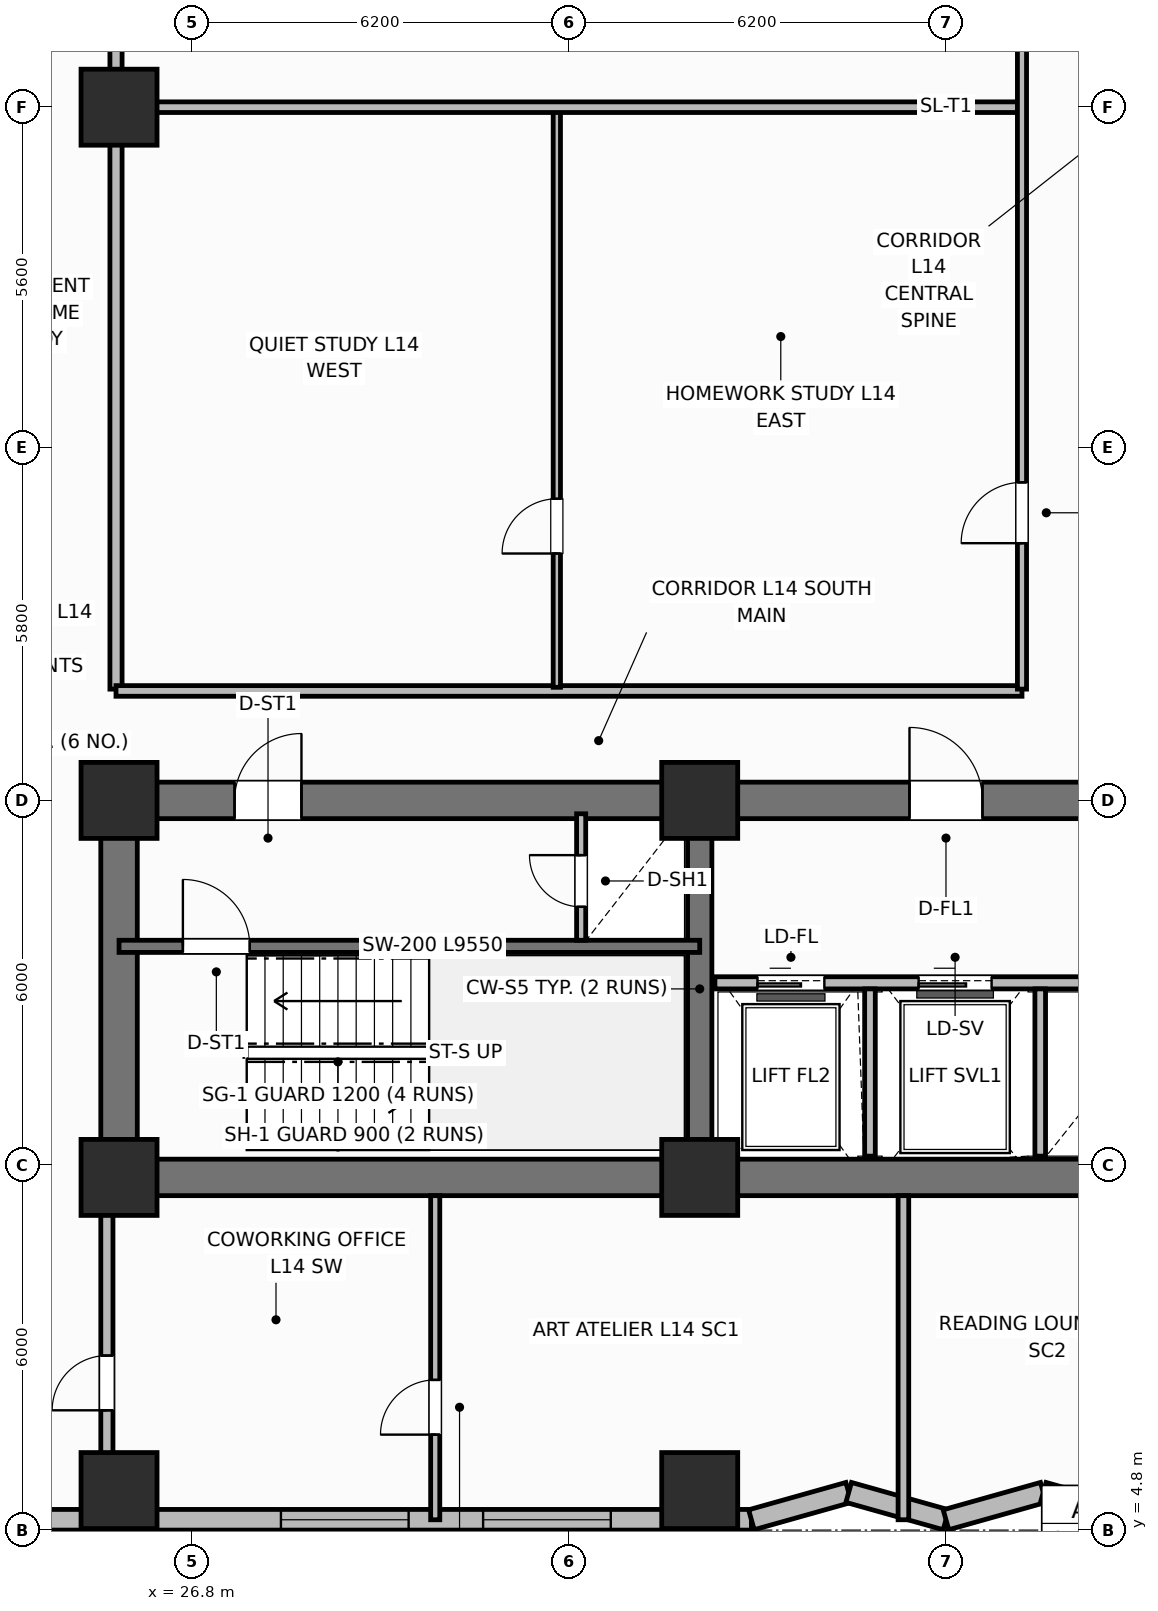
"""IFC4 building model, lengths in metres.
Left out: names, types, materials, properties, quantities, classifications, styles, units other than length and angle.
Written with IfcOpenShell. Run it as: python <this file> out.ifc"""

import sys

from ifc_helpers import new_model, si_unit, direction, frame, frame_2d, origin, origin_2d, place, context, subcontext, project, spatial, rectangle, extrude, element, fill, save


model = new_model("IFC4")
c1 = context("Model", 3, precision=1e-05, world=origin(), true_north=direction((0.0, 1.0)))
c2 = subcontext(c1, "Body", "Model", "MODEL_VIEW")
j1 = project(units=[si_unit("LENGTHUNIT", "METRE"), si_unit("PLANEANGLEUNIT", "RADIAN")], contexts=[c1])
p1 = place(None, origin())
s1 = spatial("IfcSite", under=j1, at=p1, CompositionType="ELEMENT")
p2 = place(p1, origin())
s2 = spatial("IfcBuilding", under=s1, at=p2, CompositionType="ELEMENT")
p3 = place(p2, frame((0.0, 0.0, 58.4)))
s3 = spatial("IfcBuildingStorey", under=s2, at=p3, CompositionType="ELEMENT", Elevation=58.4)
p4 = place(p3, frame((52.8, 10.6, 0.0), z_axis=(0.0, 0.0, 1.0), x_axis=(-1.0, 0.0, 0.0)))
e1 = element("IfcWall", 1, at=p4, inside=s3, PredefinedType="SHEAR", context=c2, shape_type="SweptSolid", body=[
    extrude(rectangle(XDim=27.2, YDim=0.6, at=frame_2d((13.6, 0.0))), origin(), (0.0, 0.0, 1.0), 3.7),
])
p5 = place(p3, frame((25.6, 10.9, 0.0), z_axis=(0.0, 0.0, 1.0), x_axis=(0.0, 1.0, 0.0)))
e2 = element("IfcWall", 2, at=p5, inside=s3, PredefinedType="SHEAR", context=c2, shape_type="SweptSolid", body=[
    extrude(rectangle(XDim=5.6, YDim=0.6, at=frame_2d((2.8, 0.0))), origin(), (0.0, 0.0, 1.0), 3.7),
])
p6 = place(p3, frame((25.6, 16.8, 0.0), z_axis=(0.0, 0.0, 1.0), x_axis=(1.0, 0.0, 0.0)))
e3 = element("IfcWall", 3, at=p6, inside=s3, PredefinedType="SHEAR", context=c2, shape_type="SweptSolid", body=[
    extrude(rectangle(XDim=27.2, YDim=0.6, at=frame_2d((13.6, 0.0))), origin(), (0.0, 0.0, 1.0), 3.7),
])
p7 = place(p6, frame((1.9, 0.0, 0.0)))
e4 = element("IfcOpeningElement", 4, at=p7, cuts=e3, PredefinedType="OPENING", context=c2, shape_type="SweptSolid", body=[
    extrude(rectangle(XDim=1.1, YDim=2.15, at=frame_2d((0.55, 1.075))), frame((0.0, 0.31, 0.0), z_axis=(0.0, -1.0, 0.0), x_axis=(1.0, 0.0, 0.0)), (0.0, 0.0, 1.0), 0.62),
])
p8 = place(p6, frame((13.0, 0.0, 0.0)))
e5 = element("IfcOpeningElement", 5, at=p8, cuts=e3, PredefinedType="OPENING", context=c2, shape_type="SweptSolid", body=[
    extrude(rectangle(XDim=1.2, YDim=2.15, at=frame_2d((0.6, 1.075))), frame((0.0, 0.31, 0.0), z_axis=(0.0, -1.0, 0.0), x_axis=(1.0, 0.0, 0.0)), (0.0, 0.0, 1.0), 0.62),
])
p9 = place(p6, frame((20.4, 0.0, 0.0)))
e6 = element("IfcOpeningElement", 6, at=p9, cuts=e3, PredefinedType="OPENING", context=c2, shape_type="SweptSolid", body=[
    extrude(rectangle(XDim=1.3, YDim=2.2, at=frame_2d((0.65, 1.1))), frame((0.0, 0.31, 0.0), z_axis=(0.0, -1.0, 0.0), x_axis=(1.0, 0.0, 0.0)), (0.0, 0.0, 1.0), 0.62),
])
p10 = place(p6, frame((24.65, 0.0, 0.0)))
e7 = element("IfcOpeningElement", 7, at=p10, cuts=e3, PredefinedType="OPENING", context=c2, shape_type="SweptSolid", body=[
    extrude(rectangle(XDim=0.85, YDim=2.1, at=frame_2d((0.425, 1.05))), frame((0.0, 0.31, 0.0), z_axis=(0.0, -1.0, 0.0), x_axis=(1.0, 0.0, 0.0)), (0.0, 0.0, 1.0), 0.62),
])
p11 = place(p3, frame((35.15, 10.9, 0.0), z_axis=(0.0, 0.0, 1.0), x_axis=(0.0, 1.0, 0.0)))
e8 = element("IfcWall", 8, at=p11, inside=s3, PredefinedType="SHEAR", context=c2, shape_type="SweptSolid", body=[
    extrude(rectangle(XDim=5.6, YDim=0.4, at=frame_2d((2.8, 0.0))), origin(), (0.0, 0.0, 1.0), 3.7),
])
for number, where, z_axis, x_axis in (
    (9, (25.6, 10.6, 0.0), (0.0, 0.0, 1.0), (1.0, 0.0, 0.0)),
    (10, (25.6, 16.8, 0.0), (0.0, 0.0, 1.0), (1.0, 0.0, 0.0)),
    (11, (35.15, 10.6, 0.0), (0.0, 0.0, 1.0), (1.0, 0.0, 0.0)),
    (12, (35.15, 16.8, 0.0), (0.0, 0.0, 1.0), (1.0, 0.0, 0.0)),
    (13, (25.6, 28.2, 0.0), (0.0, 0.0, 1.0), (1.0, 0.0, 0.0)),
    (14, (25.6, 5.45, 0.0), (0.0, 0.0, 1.0), (1.0, 0.0, 0.0)),
    (15, (35.15, 5.45, 0.0), (0.0, 0.0, 1.0), (1.0, 0.0, 0.0)),
):
    element("IfcColumn", number, at=place(p3, frame(where, z_axis=z_axis, x_axis=x_axis)), inside=s3, PredefinedType="COLUMN", context=c2, shape_type="SweptSolid", body=[
        extrude(rectangle(XDim=1.25, YDim=1.25, at=origin_2d()), origin(), (0.0, 0.0, 1.0), 3.7),
    ])
p12 = place(p3, frame((18.6, 4.97, 0.0), z_axis=(0.0, 0.0, 1.0), x_axis=(1.0, 0.0, 0.0)))
e16 = element("IfcWall", 16, at=p12, inside=s3, PredefinedType="SOLIDWALL", context=c2, shape_type="SweptSolid", body=[
    extrude(rectangle(XDim=17.4, YDim=0.34, at=frame_2d((8.7, 0.0))), origin(), (0.0, 0.0, 1.0), 2.7),
])
p13 = place(p12, frame((1.262, 0.0, 0.68)))
e17 = element("IfcOpeningElement", 17, at=p13, cuts=e16, PredefinedType="OPENING", context=c2, shape_type="SweptSolid", body=[
    extrude(rectangle(XDim=2.1, YDim=1.9, at=frame_2d((1.05, 0.95))), frame((0.0, 0.18, 0.0), z_axis=(0.0, -1.0, 0.0), x_axis=(1.0, 0.0, 0.0)), (0.0, 0.0, 1.0), 0.36),
])
p14 = place(p12, frame((9.663, 0.0, 0.68)))
e18 = element("IfcOpeningElement", 18, at=p14, cuts=e16, PredefinedType="OPENING", context=c2, shape_type="SweptSolid", body=[
    extrude(rectangle(XDim=2.1, YDim=1.9, at=frame_2d((1.05, 0.95))), frame((0.0, 0.18, 0.0), z_axis=(0.0, -1.0, 0.0), x_axis=(1.0, 0.0, 0.0)), (0.0, 0.0, 1.0), 0.36),
])
p15 = place(p12, frame((12.988, 0.0, 0.68)))
e19 = element("IfcOpeningElement", 19, at=p15, cuts=e16, PredefinedType="OPENING", context=c2, shape_type="SweptSolid", body=[
    extrude(rectangle(XDim=2.1, YDim=1.9, at=frame_2d((1.05, 0.95))), frame((0.0, 0.18, 0.0), z_axis=(0.0, -1.0, 0.0), x_axis=(1.0, 0.0, 0.0)), (0.0, 0.0, 1.0), 0.36),
])
p16 = place(p3, frame((36.0, 4.97, 0.0), z_axis=(0.0, 0.0, 1.0), x_axis=(0.962662902433, 0.270703040766, 0.0)))
e20 = element("IfcWall", 20, at=p16, inside=s3, PredefinedType="SOLIDWALL", context=c2, shape_type="SweptSolid", body=[
    extrude(rectangle(XDim=1.662, YDim=0.34, at=frame_2d((0.831, 0.0))), origin(), (0.0, 0.0, 1.0), 2.7),
])
p17 = place(p3, frame((37.6, 5.42, 0.0), z_axis=(0.0, 0.0, 1.0), x_axis=(0.962652136636, -0.270741322725, 0.0)))
e21 = element("IfcWall", 21, at=p17, inside=s3, PredefinedType="SOLIDWALL", context=c2, shape_type="SweptSolid", body=[
    extrude(rectangle(XDim=1.662, YDim=0.34, at=frame_2d((0.831, 0.0))), origin(), (0.0, 0.0, 1.0), 2.7),
])
p18 = place(p3, frame((39.2, 4.97, 0.0), z_axis=(0.0, 0.0, 1.0), x_axis=(0.962662902433, 0.270703040766, 0.0)))
e22 = element("IfcWall", 22, at=p18, inside=s3, PredefinedType="SOLIDWALL", context=c2, shape_type="SweptSolid", body=[
    extrude(rectangle(XDim=1.662, YDim=0.34, at=frame_2d((0.831, 0.0))), origin(), (0.0, 0.0, 1.0), 2.7),
])
p19 = place(p3, frame((40.8, 5.42, 0.0), z_axis=(0.0, 0.0, 1.0), x_axis=(0.962652136636, -0.270741322725, 0.0)))
e23 = element("IfcWall", 23, at=p19, inside=s3, PredefinedType="SOLIDWALL", context=c2, shape_type="SweptSolid", body=[
    extrude(rectangle(XDim=1.662, YDim=0.34, at=frame_2d((0.831, 0.0))), origin(), (0.0, 0.0, 1.0), 2.7),
])
p20 = place(p3, frame((25.6, 14.4, 0.0), z_axis=(0.0, 0.0, 1.0), x_axis=(1.0, 0.0, 0.0)))
e24 = element("IfcWall", 24, at=p20, inside=s3, PredefinedType="SHEAR", context=c2, shape_type="SweptSolid", body=[
    extrude(rectangle(XDim=9.55, YDim=0.2, at=frame_2d((4.775, 0.0))), origin(), (0.0, 0.0, 1.0), 3.7),
])
p21 = place(p20, frame((1.05, 0.0, 0.0)))
e25 = element("IfcOpeningElement", 25, at=p21, cuts=e24, PredefinedType="OPENING", context=c2, shape_type="SweptSolid", body=[
    extrude(rectangle(XDim=1.1, YDim=2.15, at=frame_2d((0.55, 1.075))), frame((0.0, 0.11, 0.0), z_axis=(0.0, -1.0, 0.0), x_axis=(1.0, 0.0, 0.0)), (0.0, 0.0, 1.0), 0.22),
])
p22 = place(p3, frame((33.2, 14.5, 0.0), z_axis=(0.0, 0.0, 1.0), x_axis=(0.0, 1.0, 0.0)))
e26 = element("IfcWall", 26, at=p22, inside=s3, PredefinedType="PARTITIONING", context=c2, shape_type="SweptSolid", body=[
    extrude(rectangle(XDim=2.08, YDim=0.15, at=frame_2d((1.04, 0.0))), origin(), (0.0, 0.0, 1.0), 2.53),
])
p23 = place(p22, frame((0.55, 0.0, 0.0)))
e27 = element("IfcOpeningElement", 27, at=p23, cuts=e26, PredefinedType="OPENING", context=c2, shape_type="SweptSolid", body=[
    extrude(rectangle(XDim=0.85, YDim=2.05, at=frame_2d((0.425, 1.025))), frame((0.0, 0.085, 0.0), z_axis=(0.0, -1.0, 0.0), x_axis=(1.0, 0.0, 0.0)), (0.0, 0.0, 1.0), 0.17),
])
p24 = place(p3, frame((35.4, 13.8, 0.0), z_axis=(0.0, 0.0, 1.0), x_axis=(1.0, 0.0, 0.0)))
e28 = element("IfcWall", 28, at=p24, inside=s3, PredefinedType="PARTITIONING", context=c2, shape_type="SweptSolid", body=[
    extrude(rectangle(XDim=7.6, YDim=0.2, at=frame_2d((3.8, 0.0))), origin(), (0.0, 0.0, 1.0), 2.3),
])
p25 = place(p24, frame((0.7, 0.0, 0.0)))
e29 = element("IfcOpeningElement", 29, at=p25, cuts=e28, PredefinedType="OPENING", context=c2, shape_type="SweptSolid", body=[
    extrude(rectangle(XDim=1.1, YDim=2.15, at=frame_2d((0.55, 1.075))), frame((0.0, 0.11, 0.0), z_axis=(0.0, -1.0, 0.0), x_axis=(1.0, 0.0, 0.0)), (0.0, 0.0, 1.0), 0.22),
])
p26 = place(p24, frame((3.35, 0.0, 0.0)))
e30 = element("IfcOpeningElement", 30, at=p26, cuts=e28, PredefinedType="OPENING", context=c2, shape_type="SweptSolid", body=[
    extrude(rectangle(XDim=1.2, YDim=2.15, at=frame_2d((0.6, 1.075))), frame((0.0, 0.11, 0.0), z_axis=(0.0, -1.0, 0.0), x_axis=(1.0, 0.0, 0.0)), (0.0, 0.0, 1.0), 0.22),
])
for number, where, z_axis, x_axis in (
    (31, (37.95, 10.95, 0.0), (0.0, 0.0, 1.0), (0.0, 1.0, 0.0)),
    (32, (40.75, 10.95, 0.0), (0.0, 0.0, 1.0), (0.0, 1.0, 0.0)),
):
    element("IfcWall", number, at=place(p3, frame(where, z_axis=z_axis, x_axis=x_axis)), inside=s3, PredefinedType="PARTITIONING", context=c2, shape_type="SweptSolid", body=[
        extrude(rectangle(XDim=2.75, YDim=0.175, at=frame_2d((1.375, 0.0))), origin(), (0.0, 0.0, 1.0), 2.53),
    ])
p27 = place(p3, frame((25.55, 18.63, 0.0), z_axis=(0.0, 0.0, 1.0), x_axis=(0.0, 1.0, 0.0)))
e33 = element("IfcWall", 33, at=p27, inside=s3, PredefinedType="PARTITIONING", context=c2, shape_type="SweptSolid", body=[
    extrude(rectangle(XDim=19.14, YDim=0.2, at=frame_2d((9.57, 0.0))), origin(), (0.0, 0.0, 1.0), 2.53),
])
p28 = place(p3, frame((25.55, 18.6, 0.0), z_axis=(0.0, 0.0, 1.0), x_axis=(1.0, 0.0, 0.0)))
e34 = element("IfcWall", 34, at=p28, inside=s3, PredefinedType="PARTITIONING", context=c2, shape_type="SweptSolid", body=[
    extrude(rectangle(XDim=14.9, YDim=0.175, at=frame_2d((7.45, 0.0))), origin(), (0.0, 0.0, 1.0), 2.53),
])
p29 = place(p3, frame((32.8, 18.66, 0.0), z_axis=(0.0, 0.0, 1.0), x_axis=(0.0, 1.0, 0.0)))
e35 = element("IfcWall", 35, at=p29, inside=s3, PredefinedType="PARTITIONING", context=c2, shape_type="SweptSolid", body=[
    extrude(rectangle(XDim=9.49, YDim=0.12, at=frame_2d((4.745, 0.0))), origin(), (0.0, 0.0, 1.0), 2.53),
])
p30 = place(p29, frame((2.2, 0.0, 0.0)))
e36 = element("IfcOpeningElement", 36, at=p30, cuts=e35, PredefinedType="OPENING", context=c2, shape_type="SweptSolid", body=[
    extrude(rectangle(XDim=0.9, YDim=2.1, at=frame_2d((0.45, 1.05))), frame((0.0, 0.07, 0.0), z_axis=(0.0, -1.0, 0.0), x_axis=(1.0, 0.0, 0.0)), (0.0, 0.0, 1.0), 0.14),
])
p31 = place(p3, frame((25.6, 28.2, 0.0), z_axis=(0.0, 0.0, 1.0), x_axis=(1.0, 0.0, 0.0)))
e37 = element("IfcWall", 37, at=p31, inside=s3, PredefinedType="PARTITIONING", context=c2, shape_type="SweptSolid", body=[
    extrude(rectangle(XDim=14.87, YDim=0.175, at=frame_2d((7.435, 0.0))), origin(), (0.0, 0.0, 1.0), 2.53),
])
p32 = place(p3, frame((40.45, 18.63, 0.0), z_axis=(0.0, 0.0, 1.0), x_axis=(0.0, 1.0, 0.0)))
e38 = element("IfcWall", 38, at=p32, inside=s3, PredefinedType="PARTITIONING", context=c2, shape_type="SweptSolid", body=[
    extrude(rectangle(XDim=19.14, YDim=0.15, at=frame_2d((9.57, 0.0))), origin(), (0.0, 0.0, 1.0), 2.53),
])
p33 = place(p32, frame((2.4, 0.0, 0.0)))
e39 = element("IfcOpeningElement", 39, at=p33, cuts=e38, PredefinedType="OPENING", context=c2, shape_type="SweptSolid", body=[
    extrude(rectangle(XDim=1.0, YDim=2.15, at=frame_2d((0.5, 1.075))), frame((0.0, 0.085, 0.0), z_axis=(0.0, -1.0, 0.0), x_axis=(1.0, 0.0, 0.0)), (0.0, 0.0, 1.0), 0.17),
])
p34 = place(p32, frame((11.4, 0.0, 0.0)))
e40 = element("IfcOpeningElement", 40, at=p34, cuts=e38, PredefinedType="OPENING", context=c2, shape_type="SweptSolid", body=[
    extrude(rectangle(XDim=1.0, YDim=2.15, at=frame_2d((0.5, 1.075))), frame((0.0, 0.085, 0.0), z_axis=(0.0, -1.0, 0.0), x_axis=(1.0, 0.0, 0.0)), (0.0, 0.0, 1.0), 0.17),
])
p35 = place(p3, frame((30.8, 4.97, 0.0), z_axis=(0.0, 0.0, 1.0), x_axis=(0.0, 1.0, 0.0)))
e41 = element("IfcWall", 41, at=p35, inside=s3, PredefinedType="PARTITIONING", context=c2, shape_type="SweptSolid", body=[
    extrude(rectangle(XDim=5.33, YDim=0.15, at=frame_2d((2.665, 0.0))), origin(), (0.0, 0.0, 1.0), 2.53),
])
p36 = place(p35, frame((1.4, 0.0, 0.0)))
e42 = element("IfcOpeningElement", 42, at=p36, cuts=e41, PredefinedType="OPENING", context=c2, shape_type="SweptSolid", body=[
    extrude(rectangle(XDim=0.9, YDim=2.1, at=frame_2d((0.45, 1.05))), frame((0.0, 0.085, 0.0), z_axis=(0.0, -1.0, 0.0), x_axis=(1.0, 0.0, 0.0)), (0.0, 0.0, 1.0), 0.17),
])
p37 = place(p3, frame((38.5, 4.97, 0.0), z_axis=(0.0, 0.0, 1.0), x_axis=(0.0, 1.0, 0.0)))
e43 = element("IfcWall", 43, at=p37, inside=s3, PredefinedType="PARTITIONING", context=c2, shape_type="SweptSolid", body=[
    extrude(rectangle(XDim=5.33, YDim=0.175, at=frame_2d((2.665, 0.0))), origin(), (0.0, 0.0, 1.0), 2.53),
])
p38 = place(p3, frame((25.4, 5.72, 0.0), z_axis=(0.0, 0.0, 1.0), x_axis=(0.0, 1.0, 0.0)))
e44 = element("IfcWall", 44, at=p38, inside=s3, PredefinedType="PARTITIONING", context=c2, shape_type="SweptSolid", body=[
    extrude(rectangle(XDim=4.58, YDim=0.2, at=frame_2d((2.29, 0.0))), origin(), (0.0, 0.0, 1.0), 2.53),
])
p39 = place(p38, frame((1.05, 0.0, 0.0)))
e45 = element("IfcOpeningElement", 45, at=p39, cuts=e44, PredefinedType="OPENING", context=c2, shape_type="SweptSolid", body=[
    extrude(rectangle(XDim=0.9, YDim=2.1, at=frame_2d((0.45, 1.05))), frame((0.0, 0.11, 0.0), z_axis=(0.0, -1.0, 0.0), x_axis=(1.0, 0.0, 0.0)), (0.0, 0.0, 1.0), 0.22),
])
p40 = place(p14, origin())
e46 = element("IfcWindow", 46, at=p40, inside=s3, PartitioningType="SINGLE_PANEL", PredefinedType="WINDOW", context=c2, shape_type="SweptSolid", body=[
    extrude(rectangle(XDim=2.1, YDim=1.9, at=frame_2d((1.05, 0.95))), frame((0.0, 0.03, 0.0), z_axis=(0.0, -1.0, 0.0), x_axis=(1.0, 0.0, 0.0)), (0.0, 0.0, 1.0), 0.06),
])
fill(e18, e46)
p41 = place(p15, origin())
e47 = element("IfcWindow", 47, at=p41, inside=s3, PartitioningType="SINGLE_PANEL", PredefinedType="WINDOW", context=c2, shape_type="SweptSolid", body=[
    extrude(rectangle(XDim=2.1, YDim=1.9, at=frame_2d((1.05, 0.95))), frame((0.0, 0.03, 0.0), z_axis=(0.0, -1.0, 0.0), x_axis=(1.0, 0.0, 0.0)), (0.0, 0.0, 1.0), 0.06),
])
fill(e19, e47)
p42 = place(p21, origin())
e48 = element("IfcDoor", 48, at=p42, inside=s3, OperationType="SINGLE_SWING_LEFT", PredefinedType="DOOR", context=c2, shape_type="SweptSolid", body=[
    extrude(rectangle(XDim=1.1, YDim=2.15, at=frame_2d((0.55, 1.075))), frame((0.0, 0.025, 0.0), z_axis=(0.0, -1.0, 0.0), x_axis=(1.0, 0.0, 0.0)), (0.0, 0.0, 1.0), 0.05),
])
fill(e25, e48)
p43 = place(p23, origin())
e49 = element("IfcDoor", 49, at=p43, inside=s3, OperationType="SINGLE_SWING_RIGHT", PredefinedType="TRAPDOOR", context=c2, shape_type="SweptSolid", body=[
    extrude(rectangle(XDim=0.85, YDim=2.05, at=frame_2d((0.425, 1.025))), frame((0.0, 0.025, 0.0), z_axis=(0.0, -1.0, 0.0), x_axis=(1.0, 0.0, 0.0)), (0.0, 0.0, 1.0), 0.05),
])
fill(e27, e49)
p44 = place(p25, origin())
e50 = element("IfcDoor", 50, at=p44, inside=s3, OperationType="SLIDING_TO_LEFT", PredefinedType="DOOR", context=c2, shape_type="SweptSolid", body=[
    extrude(rectangle(XDim=1.1, YDim=2.15, at=frame_2d((0.55, 1.075))), frame((0.0, 0.025, 0.0), z_axis=(0.0, -1.0, 0.0), x_axis=(1.0, 0.0, 0.0)), (0.0, 0.0, 1.0), 0.05),
])
fill(e29, e50)
p45 = place(p26, origin())
e51 = element("IfcDoor", 51, at=p45, inside=s3, OperationType="SLIDING_TO_LEFT", PredefinedType="DOOR", context=c2, shape_type="SweptSolid", body=[
    extrude(rectangle(XDim=1.2, YDim=2.15, at=frame_2d((0.6, 1.075))), frame((0.0, 0.025, 0.0), z_axis=(0.0, -1.0, 0.0), x_axis=(1.0, 0.0, 0.0)), (0.0, 0.0, 1.0), 0.05),
])
fill(e30, e51)
p46 = place(p30, origin())
e52 = element("IfcDoor", 52, at=p46, inside=s3, OperationType="SINGLE_SWING_LEFT", PredefinedType="DOOR", context=c2, shape_type="SweptSolid", body=[
    extrude(rectangle(XDim=0.9, YDim=2.1, at=frame_2d((0.45, 1.05))), frame((0.0, 0.025, 0.0), z_axis=(0.0, -1.0, 0.0), x_axis=(1.0, 0.0, 0.0)), (0.0, 0.0, 1.0), 0.05),
])
fill(e36, e52)
p47 = place(p33, origin())
e53 = element("IfcDoor", 53, at=p47, inside=s3, OperationType="SINGLE_SWING_LEFT", PredefinedType="DOOR", context=c2, shape_type="SweptSolid", body=[
    extrude(rectangle(XDim=1.0, YDim=2.15, at=frame_2d((0.5, 1.075))), frame((0.0, 0.025, 0.0), z_axis=(0.0, -1.0, 0.0), x_axis=(1.0, 0.0, 0.0)), (0.0, 0.0, 1.0), 0.05),
])
fill(e39, e53)
p48 = place(p36, origin())
e54 = element("IfcDoor", 54, at=p48, inside=s3, OperationType="SINGLE_SWING_LEFT", PredefinedType="DOOR", context=c2, shape_type="SweptSolid", body=[
    extrude(rectangle(XDim=0.9, YDim=2.1, at=frame_2d((0.45, 1.05))), frame((0.0, 0.025, 0.0), z_axis=(0.0, -1.0, 0.0), x_axis=(1.0, 0.0, 0.0)), (0.0, 0.0, 1.0), 0.05),
])
fill(e42, e54)
p49 = place(p39, origin())
e55 = element("IfcDoor", 55, at=p49, inside=s3, OperationType="SINGLE_SWING_LEFT", PredefinedType="DOOR", context=c2, shape_type="SweptSolid", body=[
    extrude(rectangle(XDim=0.9, YDim=2.1, at=frame_2d((0.45, 1.05))), frame((0.0, 0.025, 0.0), z_axis=(0.0, -1.0, 0.0), x_axis=(1.0, 0.0, 0.0)), (0.0, 0.0, 1.0), 0.05),
])
fill(e45, e55)
p50 = place(p7, origin())
e56 = element("IfcDoor", 56, at=p50, inside=s3, OperationType="SINGLE_SWING_RIGHT", PredefinedType="DOOR", context=c2, shape_type="SweptSolid", body=[
    extrude(rectangle(XDim=1.1, YDim=2.15, at=frame_2d((0.55, 1.075))), frame((0.0, 0.025, 0.0), z_axis=(0.0, -1.0, 0.0), x_axis=(1.0, 0.0, 0.0)), (0.0, 0.0, 1.0), 0.05),
])
fill(e4, e56)
p51 = place(p8, origin())
e57 = element("IfcDoor", 57, at=p51, inside=s3, OperationType="SINGLE_SWING_LEFT", PredefinedType="DOOR", context=c2, shape_type="SweptSolid", body=[
    extrude(rectangle(XDim=1.2, YDim=2.15, at=frame_2d((0.6, 1.075))), frame((0.0, 0.025, 0.0), z_axis=(0.0, -1.0, 0.0), x_axis=(1.0, 0.0, 0.0)), (0.0, 0.0, 1.0), 0.05),
])
fill(e5, e57)
save(model, sys.argv[1])
